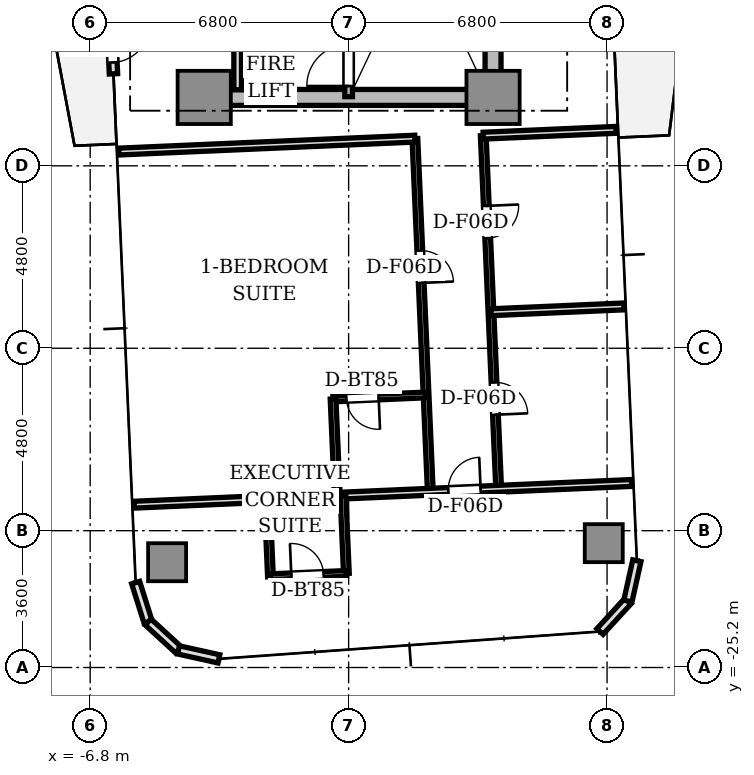
"""IFC4 building model, lengths in metres.
Left out: names, types, materials, properties, quantities, classifications, styles, units other than length and angle.
Written with IfcOpenShell. Run it as: python <this file> out.ifc"""

import sys

from ifc_helpers import new_model, si_unit, direction, frame, frame_2d, origin, origin_2d, place, context, subcontext, project, spatial, rectangle, extrude, source, transform, mapped, element, fill, save


model = new_model("IFC4")
c1 = context("Model", 3, precision=1e-05, world=origin(), true_north=direction((0.0, 1.0)))
c2 = subcontext(c1, "Body", "Model", "MODEL_VIEW")
j1 = project(units=[si_unit("LENGTHUNIT", "METRE"), si_unit("PLANEANGLEUNIT", "RADIAN")], contexts=[c1])
p1 = place(None, origin())
s1 = spatial("IfcSite", under=j1, at=p1, CompositionType="ELEMENT")
p2 = place(p1, origin())
s2 = spatial("IfcBuilding", under=s1, at=p2, CompositionType="ELEMENT")
p3 = place(p2, frame((0.0, 0.0, 103.6)))
s3 = spatial("IfcBuildingStorey", under=s2, at=p3, CompositionType="ELEMENT", Elevation=103.6)
p4 = place(p3, frame((-3.55, -10.2, 0.0), z_axis=(0.0, 0.0, 1.0), x_axis=(1.0, 0.0, 0.0)))
e1 = element("IfcWall", 1, at=p4, inside=s3, PredefinedType="SHEAR", context=c2, shape_type="SweptSolid", body=[
    extrude(rectangle(XDim=7.1, YDim=0.42, at=frame_2d((3.55, 0.0))), origin(), (0.0, 0.0, 1.0), 3.05),
])
p5 = place(p3, frame((3.8, -9.75, 0.0), z_axis=(0.0, 0.0, 1.0), x_axis=(0.0, 1.0, 0.0)))
e2 = element("IfcWall", 2, at=p5, inside=s3, PredefinedType="SHEAR", context=c2, shape_type="SweptSolid", body=[
    extrude(rectangle(XDim=6.9, YDim=0.42, at=frame_2d((3.45, 0.0))), origin(), (0.0, 0.0, 1.0), 3.05),
])
m1 = source(origin(), c2, "Body", "SweptSolid", [
    extrude(rectangle(XDim=1.4, YDim=1.4, at=origin_2d()), origin(), (0.0, 0.0, 1.0), 3.05),
])
for number, where, z_axis, x_axis in (
    (3, (-3.8, -10.2, 0.0), (0.0, 0.0, 1.0), (1.0, 0.0, 0.0)),
    (4, (3.8, -10.2, 0.0), (0.0, 0.0, 1.0), (1.0, 0.0, 0.0)),
):
    element("IfcColumn", number, at=place(p3, frame(where, z_axis=z_axis, x_axis=x_axis)), inside=s3, PredefinedType="COLUMN", context=c2, shape_type="MappedRepresentation", body=[
        mapped(m1, transform((0.0, 0.0, 0.0), scale=1.0)),
    ])
m2 = source(origin(), c2, "Body", "SweptSolid", [
    extrude(rectangle(XDim=1.0, YDim=1.0, at=origin_2d()), origin(), (0.0, 0.0, 1.0), 3.05),
])
for number, where, z_axis, x_axis in (
    (5, (-4.776, -22.43, 0.0), (0.0, 0.0, 1.0), (1.0, 0.0, 0.0)),
    (6, (6.713, -21.928, 0.0), (0.0, 0.0, 1.0), (1.0, 0.0, 0.0)),
):
    element("IfcColumn", number, at=place(p3, frame(where, z_axis=z_axis, x_axis=x_axis)), inside=s3, PredefinedType="COLUMN", context=c2, shape_type="MappedRepresentation", body=[
        mapped(m2, transform((0.0, 0.0, 0.0), scale=1.0)),
    ])
p6 = place(p3, frame((-6.306, -6.882, 0.0), z_axis=(0.0, 0.0, 1.0), x_axis=(0.043672655174, -0.999045894436, 0.0)))
e7 = element("IfcWall", 7, at=p6, inside=s3, PredefinedType="STANDARD", context=c2, shape_type="SweptSolid", body=[
    extrude(rectangle(XDim=2.7, YDim=0.22, at=frame_2d((1.35, 0.0))), origin(), (0.0, 0.0, 1.0), 3.05),
])
p7 = place(p6, frame((1.4, 0.0, 0.0)))
e8 = element("IfcOpeningElement", 8, at=p7, cuts=e7, PredefinedType="OPENING", context=c2, shape_type="SweptSolid", body=[
    extrude(rectangle(XDim=1.0, YDim=2.2, at=frame_2d((0.5, 1.1))), frame((0.0, 0.12, 0.0), z_axis=(0.0, -1.0, 0.0), x_axis=(1.0, 0.0, 0.0)), (0.0, 0.0, 1.0), 0.24),
])
p8 = place(p3, frame((-5.604, -22.966, 0.0), z_axis=(0.0, 0.0, 1.0), x_axis=(0.300755105707, -0.953701403161, 0.0)))
e9 = element("IfcWall", 9, at=p8, inside=s3, PredefinedType="STANDARD", context=c2, shape_type="SweptSolid", body=[
    extrude(rectangle(XDim=1.087, YDim=0.22, at=frame_2d((0.543, 0.0))), origin(), (0.0, 0.0, 1.0), 3.05),
])
p9 = place(p3, frame((-5.277, -24.003, 0.0), z_axis=(0.0, 0.0, 1.0), x_axis=(0.737312600672, -0.675551721847, 0.0)))
e10 = element("IfcWall", 10, at=p9, inside=s3, PredefinedType="STANDARD", context=c2, shape_type="SweptSolid", body=[
    extrude(rectangle(XDim=1.087, YDim=0.22, at=frame_2d((0.543, 0.0))), origin(), (0.0, 0.0, 1.0), 3.05),
])
for number, where, z_axis, x_axis in (
    (11, (-4.475, -24.737, 0.0), (0.0, 0.0, 1.0), (0.976, -0.217, 0.0)),
    (12, (6.614, -24.253, 0.0), (0.0, 0.0, 1.0), (0.676, 0.737, 0.0)),
):
    element("IfcWall", number, at=place(p3, frame(where, z_axis=z_axis, x_axis=x_axis)), inside=s3, PredefinedType="STANDARD", context=c2, shape_type="SweptSolid", body=[
        extrude(rectangle(XDim=1.087, YDim=0.22, at=frame_2d((0.543, 0.0))), origin(), (0.0, 0.0, 1.0), 3.05),
    ])
p10 = place(p3, frame((7.349, -23.452, 0.0), z_axis=(0.0, 0.0, 1.0), x_axis=(0.216454939174, 0.976292609471, 0.0)))
e13 = element("IfcWall", 13, at=p10, inside=s3, PredefinedType="STANDARD", context=c2, shape_type="SweptSolid", body=[
    extrude(rectangle(XDim=1.087, YDim=0.22, at=frame_2d((0.544, 0.0))), origin(), (0.0, 0.0, 1.0), 3.05),
])
p11 = place(p3, frame((0.0, -10.18, 0.0), z_axis=(0.0, 0.0, 1.0), x_axis=(0.0, 1.0, 0.0)))
e14 = element("IfcWall", 14, at=p11, inside=s3, PredefinedType="SOLIDWALL", context=c2, shape_type="SweptSolid", body=[
    extrude(rectangle(XDim=7.68, YDim=0.2, at=frame_2d((3.84, 0.0))), origin(), (0.0, 0.0, 1.0), 3.05),
])
p12 = place(p11, frame((0.28, 0.0, 0.0)))
e15 = element("IfcOpeningElement", 15, at=p12, cuts=e14, PredefinedType="OPENING", context=c2, shape_type="SweptSolid", body=[
    extrude(rectangle(XDim=1.1, YDim=2.15, at=frame_2d((0.55, 1.075))), frame((0.0, 0.11, 0.0), z_axis=(0.0, -1.0, 0.0), x_axis=(1.0, 0.0, 0.0)), (0.0, 0.0, 1.0), 0.22),
])
p13 = place(p3, frame((-2.92, -10.0, 0.0), z_axis=(0.0, 0.0, 1.0), x_axis=(0.0, 1.0, 0.0)))
e16 = element("IfcWall", 16, at=p13, inside=s3, PredefinedType="SOLIDWALL", context=c2, shape_type="SweptSolid", body=[
    extrude(rectangle(XDim=1.44, YDim=0.2, at=frame_2d((0.72, 0.0))), origin(), (0.0, 0.0, 1.0), 2.6),
])
p14 = place(p3, frame((3.542, -11.206, 0.0), z_axis=(0.0, 0.0, 1.0), x_axis=(0.043604692074, -0.999048863084, 0.0)))
e17 = element("IfcWall", 17, at=p14, inside=s3, PredefinedType="PARTITIONING", context=c2, shape_type="SweptSolid", body=[
    extrude(rectangle(XDim=9.3, YDim=0.15, at=frame_2d((4.65, 0.0))), origin(), (0.0, 0.0, 1.0), 2.6),
])
p15 = place(p14, frame((1.85, 0.0, 0.0)))
e18 = element("IfcOpeningElement", 18, at=p15, cuts=e17, PredefinedType="OPENING", context=c2, shape_type="SweptSolid", body=[
    extrude(rectangle(XDim=0.85, YDim=2.1, at=frame_2d((0.425, 1.05))), frame((0.0, 0.085, 0.0), z_axis=(0.0, -1.0, 0.0), x_axis=(1.0, 0.0, 0.0)), (0.0, 0.0, 1.0), 0.17),
])
p16 = place(p14, frame((6.5, 0.0, 0.0)))
e19 = element("IfcOpeningElement", 19, at=p16, cuts=e17, PredefinedType="OPENING", context=c2, shape_type="SweptSolid", body=[
    extrude(rectangle(XDim=0.85, YDim=2.1, at=frame_2d((0.425, 1.05))), frame((0.0, 0.085, 0.0), z_axis=(0.0, -1.0, 0.0), x_axis=(1.0, 0.0, 0.0)), (0.0, 0.0, 1.0), 0.17),
])
p17 = place(p3, frame((1.744, -11.285, 0.0), z_axis=(0.0, 0.0, 1.0), x_axis=(0.043630894187, -0.999047719117, 0.0)))
e20 = element("IfcWall", 20, at=p17, inside=s3, PredefinedType="PARTITIONING", context=c2, shape_type="SweptSolid", body=[
    extrude(rectangle(XDim=9.3, YDim=0.15, at=frame_2d((4.65, 0.0))), origin(), (0.0, 0.0, 1.0), 2.6),
])
p18 = place(p17, frame((2.95, 0.0, 0.0)))
e21 = element("IfcOpeningElement", 21, at=p18, cuts=e20, PredefinedType="OPENING", context=c2, shape_type="SweptSolid", body=[
    extrude(rectangle(XDim=0.85, YDim=2.1, at=frame_2d((0.425, 1.05))), frame((0.0, 0.085, 0.0), z_axis=(0.0, -1.0, 0.0), x_axis=(1.0, 0.0, 0.0)), (0.0, 0.0, 1.0), 0.17),
])
p19 = place(p3, frame((3.542, -11.206, 0.0), z_axis=(0.0, 0.0, 1.0), x_axis=(0.999046129111, 0.04366728647, 0.0)))
e22 = element("IfcWall", 22, at=p19, inside=s3, PredefinedType="PARTITIONING", context=c2, shape_type="SweptSolid", body=[
    extrude(rectangle(XDim=3.5, YDim=0.18, at=frame_2d((1.75, 0.0))), origin(), (0.0, 0.0, 1.0), 2.6),
])
p20 = place(p3, frame((-6.049, -11.625, 0.0), z_axis=(0.0, 0.0, 1.0), x_axis=(0.999047634936, 0.043632821702, 0.0)))
e23 = element("IfcWall", 23, at=p20, inside=s3, PredefinedType="PARTITIONING", context=c2, shape_type="SweptSolid", body=[
    extrude(rectangle(XDim=7.8, YDim=0.18, at=frame_2d((3.9, 0.0))), origin(), (0.0, 0.0, 1.0), 2.6),
])
p21 = place(p3, frame((3.745, -15.852, 0.0), z_axis=(0.0, 0.0, 1.0), x_axis=(0.999049169846, 0.043597663116, 0.0)))
e24 = element("IfcWall", 24, at=p21, inside=s3, PredefinedType="PARTITIONING", context=c2, shape_type="SweptSolid", body=[
    extrude(rectangle(XDim=3.5, YDim=0.18, at=frame_2d((1.75, 0.0))), origin(), (0.0, 0.0, 1.0), 2.6),
])
p22 = place(p3, frame((2.038, -18.028, 0.0), z_axis=(0.0, 0.0, 1.0), x_axis=(-0.999051263243, -0.043549666039, 0.0)))
e25 = element("IfcWall", 25, at=p22, inside=s3, PredefinedType="PARTITIONING", context=c2, shape_type="SweptSolid", body=[
    extrude(rectangle(XDim=2.45, YDim=0.15, at=frame_2d((1.225, 0.0))), origin(), (0.0, 0.0, 1.0), 2.6),
])
p23 = place(p22, frame((1.25, 0.0, 0.0)))
e26 = element("IfcOpeningElement", 26, at=p23, cuts=e25, PredefinedType="OPENING", context=c2, shape_type="SweptSolid", body=[
    extrude(rectangle(XDim=0.85, YDim=2.1, at=frame_2d((0.425, 1.05))), frame((0.0, 0.085, 0.0), z_axis=(0.0, -1.0, 0.0), x_axis=(1.0, 0.0, 0.0)), (0.0, 0.0, 1.0), 0.17),
])
p24 = place(p3, frame((-0.409, -18.135, 0.0), z_axis=(0.0, 0.0, 1.0), x_axis=(0.043561867058, -0.999050731314, 0.0)))
e27 = element("IfcWall", 27, at=p24, inside=s3, PredefinedType="PARTITIONING", context=c2, shape_type="SweptSolid", body=[
    extrude(rectangle(XDim=2.55, YDim=0.15, at=frame_2d((1.275, 0.0))), origin(), (0.0, 0.0, 1.0), 2.6),
])
p25 = place(p3, frame((-5.643, -20.916, 0.0), z_axis=(0.0, 0.0, 1.0), x_axis=(0.999047841598, 0.043628089563, 0.0)))
e28 = element("IfcWall", 28, at=p25, inside=s3, PredefinedType="PARTITIONING", context=c2, shape_type="SweptSolid", body=[
    extrude(rectangle(XDim=13.1, YDim=0.18, at=frame_2d((6.55, 0.0))), origin(), (0.0, 0.0, 1.0), 2.6),
])
p26 = place(p25, frame((8.275, 0.0, 0.0)))
e29 = element("IfcOpeningElement", 29, at=p26, cuts=e28, PredefinedType="OPENING", context=c2, shape_type="SweptSolid", body=[
    extrude(rectangle(XDim=0.85, YDim=2.1, at=frame_2d((0.425, 1.05))), frame((0.0, 0.1, 0.0), z_axis=(0.0, -1.0, 0.0), x_axis=(1.0, 0.0, 0.0)), (0.0, 0.0, 1.0), 0.2),
])
p27 = place(p3, frame((-0.148, -20.676, 0.0), z_axis=(0.0, 0.0, 1.0), x_axis=(0.043587097972, -0.999049630844, 0.0)))
e30 = element("IfcWall", 30, at=p27, inside=s3, PredefinedType="PARTITIONING", context=c2, shape_type="SweptSolid", body=[
    extrude(rectangle(XDim=2.05, YDim=0.15, at=frame_2d((1.025, 0.0))), origin(), (0.0, 0.0, 1.0), 2.6),
])
p28 = place(p3, frame((-2.146, -20.763, 0.0), z_axis=(0.0, 0.0, 1.0), x_axis=(0.043711161805, -0.9990442104, 0.0)))
e31 = element("IfcWall", 31, at=p28, inside=s3, PredefinedType="PARTITIONING", context=c2, shape_type="SweptSolid", body=[
    extrude(rectangle(XDim=2.05, YDim=0.15, at=frame_2d((1.025, 0.0))), origin(), (0.0, 0.0, 1.0), 2.6),
])
p29 = place(p3, frame((-2.057, -22.811, 0.0), z_axis=(0.0, 0.0, 1.0), x_axis=(0.999049929275, 0.043580257179, 0.0)))
e32 = element("IfcWall", 32, at=p29, inside=s3, PredefinedType="PARTITIONING", context=c2, shape_type="SweptSolid", body=[
    extrude(rectangle(XDim=2.0, YDim=0.15, at=frame_2d((1.0, 0.0))), origin(), (0.0, 0.0, 1.0), 2.6),
])
p30 = place(p29, frame((0.55, 0.0, 0.0)))
e33 = element("IfcOpeningElement", 33, at=p30, cuts=e32, PredefinedType="OPENING", context=c2, shape_type="SweptSolid", body=[
    extrude(rectangle(XDim=0.85, YDim=2.1, at=frame_2d((0.425, 1.05))), frame((0.0, 0.085, 0.0), z_axis=(0.0, -1.0, 0.0), x_axis=(1.0, 0.0, 0.0)), (0.0, 0.0, 1.0), 0.17),
])
m3 = source(origin(), c2, "Body", "SweptSolid", [
    extrude(rectangle(XDim=1.0, YDim=0.05, at=origin_2d()), origin(), (0.0, 0.0, 1.0), 2.2),
])
p31 = place(p7, frame((0.5, 0.0, 0.0)))
e34 = element("IfcDoor", 34, at=p31, inside=s3, OperationType="SINGLE_SWING_LEFT", PredefinedType="DOOR", context=c2, shape_type="MappedRepresentation", body=[
    mapped(m3, transform((0.0, 0.0, 0.0), scale=1.0)),
])
fill(e8, e34)
m4 = source(origin(), c2, "Body", "SweptSolid", [
    extrude(rectangle(XDim=1.1, YDim=0.05, at=origin_2d()), origin(), (0.0, 0.0, 1.0), 2.15),
])
p32 = place(p12, frame((0.55, 0.0, 0.0)))
e35 = element("IfcDoor", 35, at=p32, inside=s3, OperationType="SINGLE_SWING_LEFT", PredefinedType="DOOR", context=c2, shape_type="MappedRepresentation", body=[
    mapped(m4, transform((0.0, 0.0, 0.0), scale=1.0)),
])
fill(e15, e35)
m5 = source(origin(), c2, "Body", "SweptSolid", [
    extrude(rectangle(XDim=0.85, YDim=0.05, at=origin_2d()), origin(), (0.0, 0.0, 1.0), 2.1),
])
p33 = place(p15, frame((0.425, 0.0, 0.0)))
e36 = element("IfcDoor", 36, at=p33, inside=s3, OperationType="SINGLE_SWING_LEFT", PredefinedType="DOOR", context=c2, shape_type="MappedRepresentation", body=[
    mapped(m5, transform((0.0, 0.0, 0.0), scale=1.0)),
])
fill(e18, e36)
p34 = place(p16, frame((0.425, 0.0, 0.0)))
e37 = element("IfcDoor", 37, at=p34, inside=s3, OperationType="SINGLE_SWING_RIGHT", PredefinedType="DOOR", context=c2, shape_type="MappedRepresentation", body=[
    mapped(m5, transform((0.0, 0.0, 0.0), scale=1.0)),
])
fill(e19, e37)
p35 = place(p23, frame((0.425, 0.0, 0.0)))
e38 = element("IfcDoor", 38, at=p35, inside=s3, OperationType="SINGLE_SWING_LEFT", PredefinedType="DOOR", context=c2, shape_type="MappedRepresentation", body=[
    mapped(m5, transform((0.0, 0.0, 0.0), scale=1.0)),
])
fill(e26, e38)
p36 = place(p18, frame((0.425, 0.0, 0.0)))
e39 = element("IfcDoor", 39, at=p36, inside=s3, OperationType="SINGLE_SWING_RIGHT", PredefinedType="DOOR", context=c2, shape_type="MappedRepresentation", body=[
    mapped(m5, transform((0.0, 0.0, 0.0), scale=1.0)),
])
fill(e21, e39)
p37 = place(p30, frame((0.425, 0.0, 0.0)))
e40 = element("IfcDoor", 40, at=p37, inside=s3, OperationType="SINGLE_SWING_LEFT", PredefinedType="DOOR", context=c2, shape_type="MappedRepresentation", body=[
    mapped(m5, transform((0.0, 0.0, 0.0), scale=1.0)),
])
fill(e33, e40)
p38 = place(p26, frame((0.425, 0.0, 0.0)))
e41 = element("IfcDoor", 41, at=p38, inside=s3, OperationType="SINGLE_SWING_RIGHT", PredefinedType="DOOR", context=c2, shape_type="MappedRepresentation", body=[
    mapped(m5, transform((0.0, 0.0, 0.0), scale=1.0)),
])
fill(e29, e41)
save(model, sys.argv[1])
